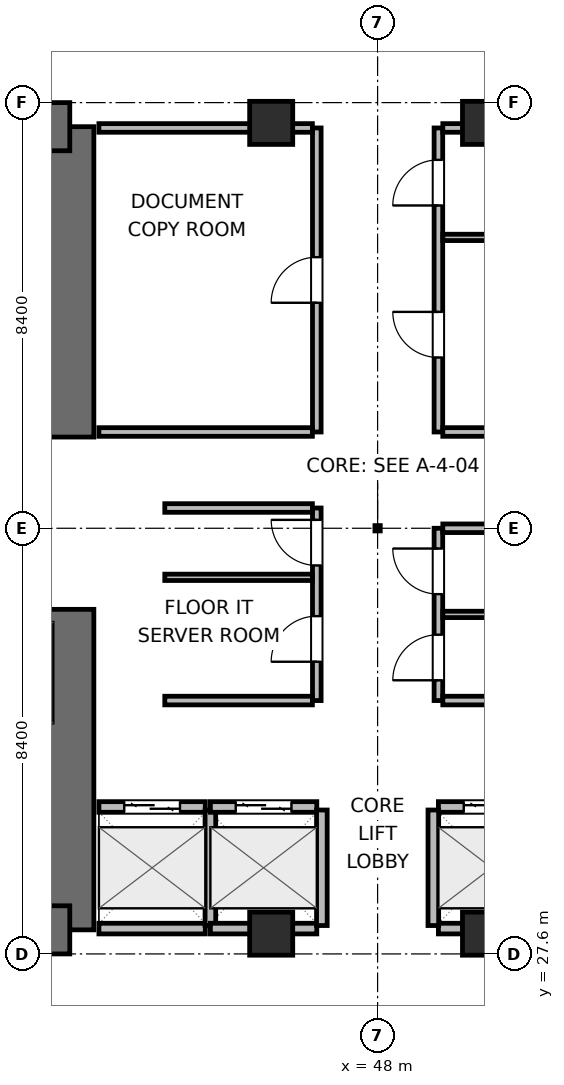
"""IFC4 building model, lengths in metres.
Left out: names, types, materials, properties, quantities, classifications, styles, units other than length and angle.
Written with IfcOpenShell. Run it as: python <this file> out.ifc"""

import sys

from ifc_helpers import new_model, si_unit, direction, frame, frame_2d, origin, origin_2d, place, context, subcontext, project, spatial, rectangle, extrude, element, fill, save


model = new_model("IFC4")
c1 = context("Model", 3, precision=1e-05, world=origin(), true_north=direction((0.0, 1.0)))
c2 = subcontext(c1, "Body", "Model", "MODEL_VIEW")
j1 = project(units=[si_unit("LENGTHUNIT", "METRE"), si_unit("PLANEANGLEUNIT", "RADIAN")], contexts=[c1])
p1 = place(None, origin())
s1 = spatial("IfcSite", under=j1, at=p1, CompositionType="ELEMENT")
p2 = place(p1, origin())
s2 = spatial("IfcBuilding", under=s1, at=p2, CompositionType="ELEMENT")
p3 = place(p2, frame((0.0, 0.0, 48.9)))
s3 = spatial("IfcBuildingStorey", under=s2, at=p3, CompositionType="ELEMENT", Elevation=48.9)
p4 = place(p3, frame((41.925, 28.075, 0.0), z_axis=(0.0, 0.0, 1.0), x_axis=(0.0, 1.0, 0.0)))
e1 = element("IfcWall", 1, at=p4, inside=s3, PredefinedType="SHEAR", context=c2, shape_type="SweptSolid", body=[
    extrude(rectangle(XDim=6.325, YDim=0.95, at=frame_2d((3.163, 0.0))), origin(), (0.0, 0.0, 1.0), 3.9),
])
p5 = place(p3, frame((41.925, 37.8, 0.0), z_axis=(0.0, 0.0, 1.0), x_axis=(0.0, 1.0, 0.0)))
e2 = element("IfcWall", 2, at=p5, inside=s3, PredefinedType="SHEAR", context=c2, shape_type="SweptSolid", body=[
    extrude(rectangle(XDim=6.125, YDim=0.95, at=frame_2d((3.062, 0.0))), origin(), (0.0, 0.0, 1.0), 3.9),
])
p6 = place(p3, frame((32.875, 28.075, 0.0), z_axis=(0.0, 0.0, 1.0), x_axis=(1.0, 0.0, 0.0)))
e3 = element("IfcWall", 3, at=p6, inside=s3, PredefinedType="SHEAR", context=c2, shape_type="SweptSolid", body=[
    extrude(rectangle(XDim=9.05, YDim=0.95, at=frame_2d((4.525, 0.0))), origin(), (0.0, 0.0, 1.0), 3.9),
])
p7 = place(p6, frame((4.975, 0.0, 0.0)))
e4 = element("IfcOpeningElement", 4, at=p7, cuts=e3, PredefinedType="OPENING", context=c2, shape_type="SweptSolid", body=[
    extrude(rectangle(XDim=1.05, YDim=2.04, at=frame_2d((0.525, 1.02))), frame((0.0, 0.485, 0.0), z_axis=(0.0, -1.0, 0.0), x_axis=(1.0, 0.0, 0.0)), (0.0, 0.0, 1.0), 0.97),
])
p8 = place(p3, frame((32.875, 43.925, 0.0), z_axis=(0.0, 0.0, 1.0), x_axis=(1.0, 0.0, 0.0)))
e5 = element("IfcWall", 5, at=p8, inside=s3, PredefinedType="SHEAR", context=c2, shape_type="SweptSolid", body=[
    extrude(rectangle(XDim=9.05, YDim=0.95, at=frame_2d((4.525, 0.0))), origin(), (0.0, 0.0, 1.0), 3.9),
])
p9 = place(p8, frame((0.975, 0.0, 0.0)))
e6 = element("IfcOpeningElement", 6, at=p9, cuts=e5, PredefinedType="OPENING", context=c2, shape_type="SweptSolid", body=[
    extrude(rectangle(XDim=0.95, YDim=2.04, at=frame_2d((0.475, 1.02))), frame((0.0, 0.485, 0.0), z_axis=(0.0, -1.0, 0.0), x_axis=(1.0, 0.0, 0.0)), (0.0, 0.0, 1.0), 0.97),
])
p10 = place(p8, frame((4.225, 0.0, 0.0)))
e7 = element("IfcOpeningElement", 7, at=p10, cuts=e5, PredefinedType="OPENING", context=c2, shape_type="SweptSolid", body=[
    extrude(rectangle(XDim=0.9, YDim=2.02, at=frame_2d((0.45, 1.01))), frame((0.0, 0.485, 0.0), z_axis=(0.0, -1.0, 0.0), x_axis=(1.0, 0.0, 0.0)), (0.0, 0.0, 1.0), 0.97),
])
p11 = place(p8, frame((7.125, 0.0, 0.0)))
e8 = element("IfcOpeningElement", 8, at=p11, cuts=e5, PredefinedType="OPENING", context=c2, shape_type="SweptSolid", body=[
    extrude(rectangle(XDim=0.9, YDim=2.02, at=frame_2d((0.45, 1.01))), frame((0.0, 0.485, 0.0), z_axis=(0.0, -1.0, 0.0), x_axis=(1.0, 0.0, 0.0)), (0.0, 0.0, 1.0), 0.97),
])
for number, where, z_axis, x_axis in (
    (9, (45.9, 28.0, 0.0), (0.0, 0.0, 1.0), (1.0, 0.0, 0.0)),
    (10, (50.1, 28.0, 0.0), (0.0, 0.0, 1.0), (1.0, 0.0, 0.0)),
    (11, (45.9, 44.0, 0.0), (0.0, 0.0, 1.0), (1.0, 0.0, 0.0)),
    (12, (50.1, 44.0, 0.0), (0.0, 0.0, 1.0), (1.0, 0.0, 0.0)),
):
    element("IfcColumn", number, at=place(p3, frame(where, z_axis=z_axis, x_axis=x_axis)), inside=s3, PredefinedType="COLUMN", context=c2, shape_type="SweptSolid", body=[
        extrude(rectangle(XDim=0.85, YDim=0.85, at=origin_2d()), origin(), (0.0, 0.0, 1.0), 3.9),
    ])
p12 = place(p3, frame((42.5, 30.5, 0.0), z_axis=(0.0, 0.0, 1.0), x_axis=(1.0, 0.0, 0.0)))
e13 = element("IfcWall", 13, at=p12, inside=s3, PredefinedType="PARTITIONING", context=c2, shape_type="SweptSolid", body=[
    extrude(rectangle(XDim=2.1, YDim=0.21, at=frame_2d((1.05, 0.0))), origin(), (0.0, 0.0, 1.0), 3.64),
])
p13 = place(p12, frame((0.5, 0.0, 0.0)))
e14 = element("IfcOpeningElement", 14, at=p13, cuts=e13, PredefinedType="OPENING", context=c2, shape_type="SweptSolid", body=[
    extrude(rectangle(XDim=1.1, YDim=2.04, at=frame_2d((0.55, 1.02))), frame((0.0, 0.115, 0.0), z_axis=(0.0, -1.0, 0.0), x_axis=(1.0, 0.0, 0.0)), (0.0, 0.0, 1.0), 0.23),
])
p14 = place(p3, frame((42.5, 28.1, 0.0), z_axis=(0.0, 0.0, 1.0), x_axis=(1.0, 0.0, 0.0)))
e15 = element("IfcWall", 15, at=p14, inside=s3, PredefinedType="PARTITIONING", context=c2, shape_type="SweptSolid", body=[
    extrude(rectangle(XDim=2.1, YDim=0.21, at=frame_2d((1.05, 0.0))), origin(), (0.0, 0.0, 1.0), 2.525),
])
p15 = place(p3, frame((44.7, 28.16, 0.0), z_axis=(0.0, 0.0, 1.0), x_axis=(0.0, 1.0, 0.0)))
e16 = element("IfcWall", 16, at=p15, inside=s3, PredefinedType="PARTITIONING", context=c2, shape_type="SweptSolid", body=[
    extrude(rectangle(XDim=2.28, YDim=0.21, at=frame_2d((1.14, 0.0))), origin(), (0.0, 0.0, 1.0), 3.64),
])
p16 = place(p3, frame((44.7, 30.5, 0.0), z_axis=(0.0, 0.0, 1.0), x_axis=(1.0, 0.0, 0.0)))
e17 = element("IfcWall", 17, at=p16, inside=s3, PredefinedType="PARTITIONING", context=c2, shape_type="SweptSolid", body=[
    extrude(rectangle(XDim=2.1, YDim=0.21, at=frame_2d((1.05, 0.0))), origin(), (0.0, 0.0, 1.0), 3.64),
])
p17 = place(p16, frame((0.5, 0.0, 0.0)))
e18 = element("IfcOpeningElement", 18, at=p17, cuts=e17, PredefinedType="OPENING", context=c2, shape_type="SweptSolid", body=[
    extrude(rectangle(XDim=1.1, YDim=2.04, at=frame_2d((0.55, 1.02))), frame((0.0, 0.115, 0.0), z_axis=(0.0, -1.0, 0.0), x_axis=(1.0, 0.0, 0.0)), (0.0, 0.0, 1.0), 0.23),
])
p18 = place(p3, frame((44.7, 28.1, 0.0), z_axis=(0.0, 0.0, 1.0), x_axis=(1.0, 0.0, 0.0)))
e19 = element("IfcWall", 19, at=p18, inside=s3, PredefinedType="PARTITIONING", context=c2, shape_type="SweptSolid", body=[
    extrude(rectangle(XDim=2.1, YDim=0.21, at=frame_2d((1.05, 0.0))), origin(), (0.0, 0.0, 1.0), 2.525),
])
p19 = place(p3, frame((46.9, 28.16, 0.0), z_axis=(0.0, 0.0, 1.0), x_axis=(0.0, 1.0, 0.0)))
e20 = element("IfcWall", 20, at=p19, inside=s3, PredefinedType="PARTITIONING", context=c2, shape_type="SweptSolid", body=[
    extrude(rectangle(XDim=2.28, YDim=0.21, at=frame_2d((1.14, 0.0))), origin(), (0.0, 0.0, 1.0), 3.64),
])
p20 = place(p3, frame((49.2, 30.5, 0.0), z_axis=(0.0, 0.0, 1.0), x_axis=(1.0, 0.0, 0.0)))
e21 = element("IfcWall", 21, at=p20, inside=s3, PredefinedType="PARTITIONING", context=c2, shape_type="SweptSolid", body=[
    extrude(rectangle(XDim=2.1, YDim=0.21, at=frame_2d((1.05, 0.0))), origin(), (0.0, 0.0, 1.0), 3.64),
])
p21 = place(p20, frame((0.5, 0.0, 0.0)))
e22 = element("IfcOpeningElement", 22, at=p21, cuts=e21, PredefinedType="OPENING", context=c2, shape_type="SweptSolid", body=[
    extrude(rectangle(XDim=1.1, YDim=2.04, at=frame_2d((0.55, 1.02))), frame((0.0, 0.115, 0.0), z_axis=(0.0, -1.0, 0.0), x_axis=(1.0, 0.0, 0.0)), (0.0, 0.0, 1.0), 0.23),
])
p22 = place(p3, frame((49.2, 28.1, 0.0), z_axis=(0.0, 0.0, 1.0), x_axis=(1.0, 0.0, 0.0)))
e23 = element("IfcWall", 23, at=p22, inside=s3, PredefinedType="PARTITIONING", context=c2, shape_type="SweptSolid", body=[
    extrude(rectangle(XDim=2.1, YDim=0.21, at=frame_2d((1.05, 0.0))), origin(), (0.0, 0.0, 1.0), 2.525),
])
p23 = place(p3, frame((49.1, 28.16, 0.0), z_axis=(0.0, 0.0, 1.0), x_axis=(0.0, 1.0, 0.0)))
e24 = element("IfcWall", 24, at=p23, inside=s3, PredefinedType="PARTITIONING", context=c2, shape_type="SweptSolid", body=[
    extrude(rectangle(XDim=2.28, YDim=0.21, at=frame_2d((1.14, 0.0))), origin(), (0.0, 0.0, 1.0), 3.64),
])
p24 = place(p3, frame((46.8, 32.6, 0.0), z_axis=(0.0, 0.0, 1.0), x_axis=(0.0, 1.0, 0.0)))
e25 = element("IfcWall", 25, at=p24, inside=s3, PredefinedType="PARTITIONING", context=c2, shape_type="SweptSolid", body=[
    extrude(rectangle(XDim=3.8, YDim=0.17, at=frame_2d((1.9, 0.0))), origin(), (0.0, 0.0, 1.0), 3.64),
])
p25 = place(p24, frame((0.766, 0.0, 0.0)))
e26 = element("IfcOpeningElement", 26, at=p25, cuts=e25, PredefinedType="OPENING", context=c2, shape_type="SweptSolid", body=[
    extrude(rectangle(XDim=0.9, YDim=2.02, at=frame_2d((0.45, 1.01))), frame((0.0, 0.095, 0.0), z_axis=(0.0, -1.0, 0.0), x_axis=(1.0, 0.0, 0.0)), (0.0, 0.0, 1.0), 0.19),
])
p26 = place(p24, frame((2.666, 0.0, 0.0)))
e27 = element("IfcOpeningElement", 27, at=p26, cuts=e25, PredefinedType="OPENING", context=c2, shape_type="SweptSolid", body=[
    extrude(rectangle(XDim=0.9, YDim=2.02, at=frame_2d((0.45, 1.01))), frame((0.0, 0.095, 0.0), z_axis=(0.0, -1.0, 0.0), x_axis=(1.0, 0.0, 0.0)), (0.0, 0.0, 1.0), 0.19),
])
for number, where, z_axis, x_axis in (
    (28, (43.8, 32.6, 0.0), (0.0, 0.0, 1.0), (1.0, 0.0, 0.0)),
    (29, (43.8, 36.4, 0.0), (0.0, 0.0, 1.0), (1.0, 0.0, 0.0)),
):
    element("IfcWall", number, at=place(p3, frame(where, z_axis=z_axis, x_axis=x_axis)), inside=s3, PredefinedType="PARTITIONING", context=c2, shape_type="SweptSolid", body=[
        extrude(rectangle(XDim=2.913, YDim=0.17, at=frame_2d((1.457, 0.0))), origin(), (0.0, 0.0, 1.0), 3.64),
    ])
p27 = place(p3, frame((43.8, 35.032, 0.0), z_axis=(0.0, 0.0, 1.0), x_axis=(1.0, 0.0, 0.0)))
e30 = element("IfcWall", 30, at=p27, inside=s3, PredefinedType="PARTITIONING", context=c2, shape_type="SweptSolid", body=[
    extrude(rectangle(XDim=2.913, YDim=0.125, at=frame_2d((1.457, 0.0))), origin(), (0.0, 0.0, 1.0), 3.64),
])
p28 = place(p3, frame((49.2, 32.6, 0.0), z_axis=(0.0, 0.0, 1.0), x_axis=(0.0, 1.0, 0.0)))
e31 = element("IfcWall", 31, at=p28, inside=s3, PredefinedType="PARTITIONING", context=c2, shape_type="SweptSolid", body=[
    extrude(rectangle(XDim=3.4, YDim=0.17, at=frame_2d((1.7, 0.0))), origin(), (0.0, 0.0, 1.0), 3.64),
])
p29 = place(p28, frame((0.4, 0.0, 0.0)))
e32 = element("IfcOpeningElement", 32, at=p29, cuts=e31, PredefinedType="OPENING", context=c2, shape_type="SweptSolid", body=[
    extrude(rectangle(XDim=0.9, YDim=2.02, at=frame_2d((0.45, 1.01))), frame((0.0, 0.095, 0.0), z_axis=(0.0, -1.0, 0.0), x_axis=(1.0, 0.0, 0.0)), (0.0, 0.0, 1.0), 0.19),
])
p30 = place(p28, frame((2.1, 0.0, 0.0)))
e33 = element("IfcOpeningElement", 33, at=p30, cuts=e31, PredefinedType="OPENING", context=c2, shape_type="SweptSolid", body=[
    extrude(rectangle(XDim=0.9, YDim=2.02, at=frame_2d((0.45, 1.01))), frame((0.0, 0.095, 0.0), z_axis=(0.0, -1.0, 0.0), x_axis=(1.0, 0.0, 0.0)), (0.0, 0.0, 1.0), 0.19),
])
for number, where, z_axis, x_axis in (
    (34, (49.287, 32.6, 0.0), (0.0, 0.0, 1.0), (1.0, 0.0, 0.0)),
    (35, (49.287, 36.0, 0.0), (0.0, 0.0, 1.0), (1.0, 0.0, 0.0)),
):
    element("IfcWall", number, at=place(p3, frame(where, z_axis=z_axis, x_axis=x_axis)), inside=s3, PredefinedType="PARTITIONING", context=c2, shape_type="SweptSolid", body=[
        extrude(rectangle(XDim=2.913, YDim=0.17, at=frame_2d((1.457, 0.0))), origin(), (0.0, 0.0, 1.0), 3.64),
    ])
p31 = place(p3, frame((49.287, 34.3, 0.0), z_axis=(0.0, 0.0, 1.0), x_axis=(1.0, 0.0, 0.0)))
e36 = element("IfcWall", 36, at=p31, inside=s3, PredefinedType="PARTITIONING", context=c2, shape_type="SweptSolid", body=[
    extrude(rectangle(XDim=2.913, YDim=0.125, at=frame_2d((1.457, 0.0))), origin(), (0.0, 0.0, 1.0), 3.64),
])
p32 = place(p3, frame((46.8, 37.9, 0.0), z_axis=(0.0, 0.0, 1.0), x_axis=(0.0, 1.0, 0.0)))
e37 = element("IfcWall", 37, at=p32, inside=s3, PredefinedType="PARTITIONING", context=c2, shape_type="SweptSolid", body=[
    extrude(rectangle(XDim=6.0, YDim=0.17, at=frame_2d((3.0, 0.0))), origin(), (0.0, 0.0, 1.0), 3.64),
])
p33 = place(p32, frame((2.55, 0.0, 0.0)))
e38 = element("IfcOpeningElement", 38, at=p33, cuts=e37, PredefinedType="OPENING", context=c2, shape_type="SweptSolid", body=[
    extrude(rectangle(XDim=0.9, YDim=2.02, at=frame_2d((0.45, 1.01))), frame((0.0, 0.095, 0.0), z_axis=(0.0, -1.0, 0.0), x_axis=(1.0, 0.0, 0.0)), (0.0, 0.0, 1.0), 0.19),
])
p34 = place(p3, frame((42.5, 37.9, 0.0), z_axis=(0.0, 0.0, 1.0), x_axis=(1.0, 0.0, 0.0)))
e39 = element("IfcWall", 39, at=p34, inside=s3, PredefinedType="PARTITIONING", context=c2, shape_type="SweptSolid", body=[
    extrude(rectangle(XDim=4.213, YDim=0.17, at=frame_2d((2.106, 0.0))), origin(), (0.0, 0.0, 1.0), 3.64),
])
p35 = place(p3, frame((42.5, 43.9, 0.0), z_axis=(0.0, 0.0, 1.0), x_axis=(1.0, 0.0, 0.0)))
e40 = element("IfcWall", 40, at=p35, inside=s3, PredefinedType="PARTITIONING", context=c2, shape_type="SweptSolid", body=[
    extrude(rectangle(XDim=4.213, YDim=0.17, at=frame_2d((2.106, 0.0))), origin(), (0.0, 0.0, 1.0), 2.525),
])
p36 = place(p3, frame((49.2, 37.9, 0.0), z_axis=(0.0, 0.0, 1.0), x_axis=(0.0, 1.0, 0.0)))
e41 = element("IfcWall", 41, at=p36, inside=s3, PredefinedType="PARTITIONING", context=c2, shape_type="SweptSolid", body=[
    extrude(rectangle(XDim=6.0, YDim=0.17, at=frame_2d((3.0, 0.0))), origin(), (0.0, 0.0, 1.0), 3.64),
])
p37 = place(p36, frame((1.47, 0.0, 0.0)))
e42 = element("IfcOpeningElement", 42, at=p37, cuts=e41, PredefinedType="OPENING", context=c2, shape_type="SweptSolid", body=[
    extrude(rectangle(XDim=0.9, YDim=2.02, at=frame_2d((0.45, 1.01))), frame((0.0, 0.095, 0.0), z_axis=(0.0, -1.0, 0.0), x_axis=(1.0, 0.0, 0.0)), (0.0, 0.0, 1.0), 0.19),
])
p38 = place(p36, frame((4.47, 0.0, 0.0)))
e43 = element("IfcOpeningElement", 43, at=p38, cuts=e41, PredefinedType="OPENING", context=c2, shape_type="SweptSolid", body=[
    extrude(rectangle(XDim=0.9, YDim=2.02, at=frame_2d((0.45, 1.01))), frame((0.0, 0.095, 0.0), z_axis=(0.0, -1.0, 0.0), x_axis=(1.0, 0.0, 0.0)), (0.0, 0.0, 1.0), 0.19),
])
p39 = place(p3, frame((49.287, 37.9, 0.0), z_axis=(0.0, 0.0, 1.0), x_axis=(1.0, 0.0, 0.0)))
e44 = element("IfcWall", 44, at=p39, inside=s3, PredefinedType="PARTITIONING", context=c2, shape_type="SweptSolid", body=[
    extrude(rectangle(XDim=4.113, YDim=0.17, at=frame_2d((2.056, 0.0))), origin(), (0.0, 0.0, 1.0), 3.64),
])
p40 = place(p3, frame((49.287, 43.9, 0.0), z_axis=(0.0, 0.0, 1.0), x_axis=(1.0, 0.0, 0.0)))
e45 = element("IfcWall", 45, at=p40, inside=s3, PredefinedType="PARTITIONING", context=c2, shape_type="SweptSolid", body=[
    extrude(rectangle(XDim=4.113, YDim=0.17, at=frame_2d((2.056, 0.0))), origin(), (0.0, 0.0, 1.0), 2.525),
])
p41 = place(p3, frame((49.287, 41.74, 0.0), z_axis=(0.0, 0.0, 1.0), x_axis=(1.0, 0.0, 0.0)))
e46 = element("IfcWall", 46, at=p41, inside=s3, PredefinedType="PARTITIONING", context=c2, shape_type="SweptSolid", body=[
    extrude(rectangle(XDim=4.113, YDim=0.125, at=frame_2d((2.056, 0.0))), origin(), (0.0, 0.0, 1.0), 3.64),
])
p42 = place(p13, origin())
e47 = element("IfcDoor", 47, at=p42, inside=s3, OperationType="DOUBLE_DOOR_SLIDING", PredefinedType="DOOR", context=c2, shape_type="SweptSolid", body=[
    extrude(rectangle(XDim=1.1, YDim=2.04, at=frame_2d((0.55, 1.02))), frame((0.0, 0.025, 0.0), z_axis=(0.0, -1.0, 0.0), x_axis=(1.0, 0.0, 0.0)), (0.0, 0.0, 1.0), 0.05),
])
fill(e14, e47)
p43 = place(p17, origin())
e48 = element("IfcDoor", 48, at=p43, inside=s3, OperationType="DOUBLE_DOOR_SLIDING", PredefinedType="DOOR", context=c2, shape_type="SweptSolid", body=[
    extrude(rectangle(XDim=1.1, YDim=2.04, at=frame_2d((0.55, 1.02))), frame((0.0, 0.025, 0.0), z_axis=(0.0, -1.0, 0.0), x_axis=(1.0, 0.0, 0.0)), (0.0, 0.0, 1.0), 0.05),
])
fill(e18, e48)
p44 = place(p21, origin())
e49 = element("IfcDoor", 49, at=p44, inside=s3, OperationType="DOUBLE_DOOR_SLIDING", PredefinedType="DOOR", context=c2, shape_type="SweptSolid", body=[
    extrude(rectangle(XDim=1.1, YDim=2.04, at=frame_2d((0.55, 1.02))), frame((0.0, 0.025, 0.0), z_axis=(0.0, -1.0, 0.0), x_axis=(1.0, 0.0, 0.0)), (0.0, 0.0, 1.0), 0.05),
])
fill(e22, e49)
p45 = place(p25, origin())
e50 = element("IfcDoor", 50, at=p45, inside=s3, OperationType="SINGLE_SWING_LEFT", PredefinedType="DOOR", context=c2, shape_type="SweptSolid", body=[
    extrude(rectangle(XDim=0.9, YDim=2.02, at=frame_2d((0.45, 1.01))), frame((0.0, 0.025, 0.0), z_axis=(0.0, -1.0, 0.0), x_axis=(1.0, 0.0, 0.0)), (0.0, 0.0, 1.0), 0.05),
])
fill(e26, e50)
p46 = place(p26, origin())
e51 = element("IfcDoor", 51, at=p46, inside=s3, OperationType="SINGLE_SWING_RIGHT", PredefinedType="DOOR", context=c2, shape_type="SweptSolid", body=[
    extrude(rectangle(XDim=0.9, YDim=2.02, at=frame_2d((0.45, 1.01))), frame((0.0, 0.025, 0.0), z_axis=(0.0, -1.0, 0.0), x_axis=(1.0, 0.0, 0.0)), (0.0, 0.0, 1.0), 0.05),
])
fill(e27, e51)
p47 = place(p29, origin())
e52 = element("IfcDoor", 52, at=p47, inside=s3, OperationType="SINGLE_SWING_LEFT", PredefinedType="DOOR", context=c2, shape_type="SweptSolid", body=[
    extrude(rectangle(XDim=0.9, YDim=2.02, at=frame_2d((0.45, 1.01))), frame((0.0, 0.025, 0.0), z_axis=(0.0, -1.0, 0.0), x_axis=(1.0, 0.0, 0.0)), (0.0, 0.0, 1.0), 0.05),
])
fill(e32, e52)
p48 = place(p30, origin())
e53 = element("IfcDoor", 53, at=p48, inside=s3, OperationType="SINGLE_SWING_RIGHT", PredefinedType="DOOR", context=c2, shape_type="SweptSolid", body=[
    extrude(rectangle(XDim=0.9, YDim=2.02, at=frame_2d((0.45, 1.01))), frame((0.0, 0.025, 0.0), z_axis=(0.0, -1.0, 0.0), x_axis=(1.0, 0.0, 0.0)), (0.0, 0.0, 1.0), 0.05),
])
fill(e33, e53)
p49 = place(p33, origin())
e54 = element("IfcDoor", 54, at=p49, inside=s3, OperationType="SINGLE_SWING_LEFT", PredefinedType="DOOR", context=c2, shape_type="SweptSolid", body=[
    extrude(rectangle(XDim=0.9, YDim=2.02, at=frame_2d((0.45, 1.01))), frame((0.0, 0.025, 0.0), z_axis=(0.0, -1.0, 0.0), x_axis=(1.0, 0.0, 0.0)), (0.0, 0.0, 1.0), 0.05),
])
fill(e38, e54)
p50 = place(p37, origin())
e55 = element("IfcDoor", 55, at=p50, inside=s3, OperationType="SINGLE_SWING_RIGHT", PredefinedType="DOOR", context=c2, shape_type="SweptSolid", body=[
    extrude(rectangle(XDim=0.9, YDim=2.02, at=frame_2d((0.45, 1.01))), frame((0.0, 0.025, 0.0), z_axis=(0.0, -1.0, 0.0), x_axis=(1.0, 0.0, 0.0)), (0.0, 0.0, 1.0), 0.05),
])
fill(e42, e55)
p51 = place(p38, origin())
e56 = element("IfcDoor", 56, at=p51, inside=s3, OperationType="SINGLE_SWING_LEFT", PredefinedType="DOOR", context=c2, shape_type="SweptSolid", body=[
    extrude(rectangle(XDim=0.9, YDim=2.02, at=frame_2d((0.45, 1.01))), frame((0.0, 0.025, 0.0), z_axis=(0.0, -1.0, 0.0), x_axis=(1.0, 0.0, 0.0)), (0.0, 0.0, 1.0), 0.05),
])
fill(e43, e56)
save(model, sys.argv[1])
